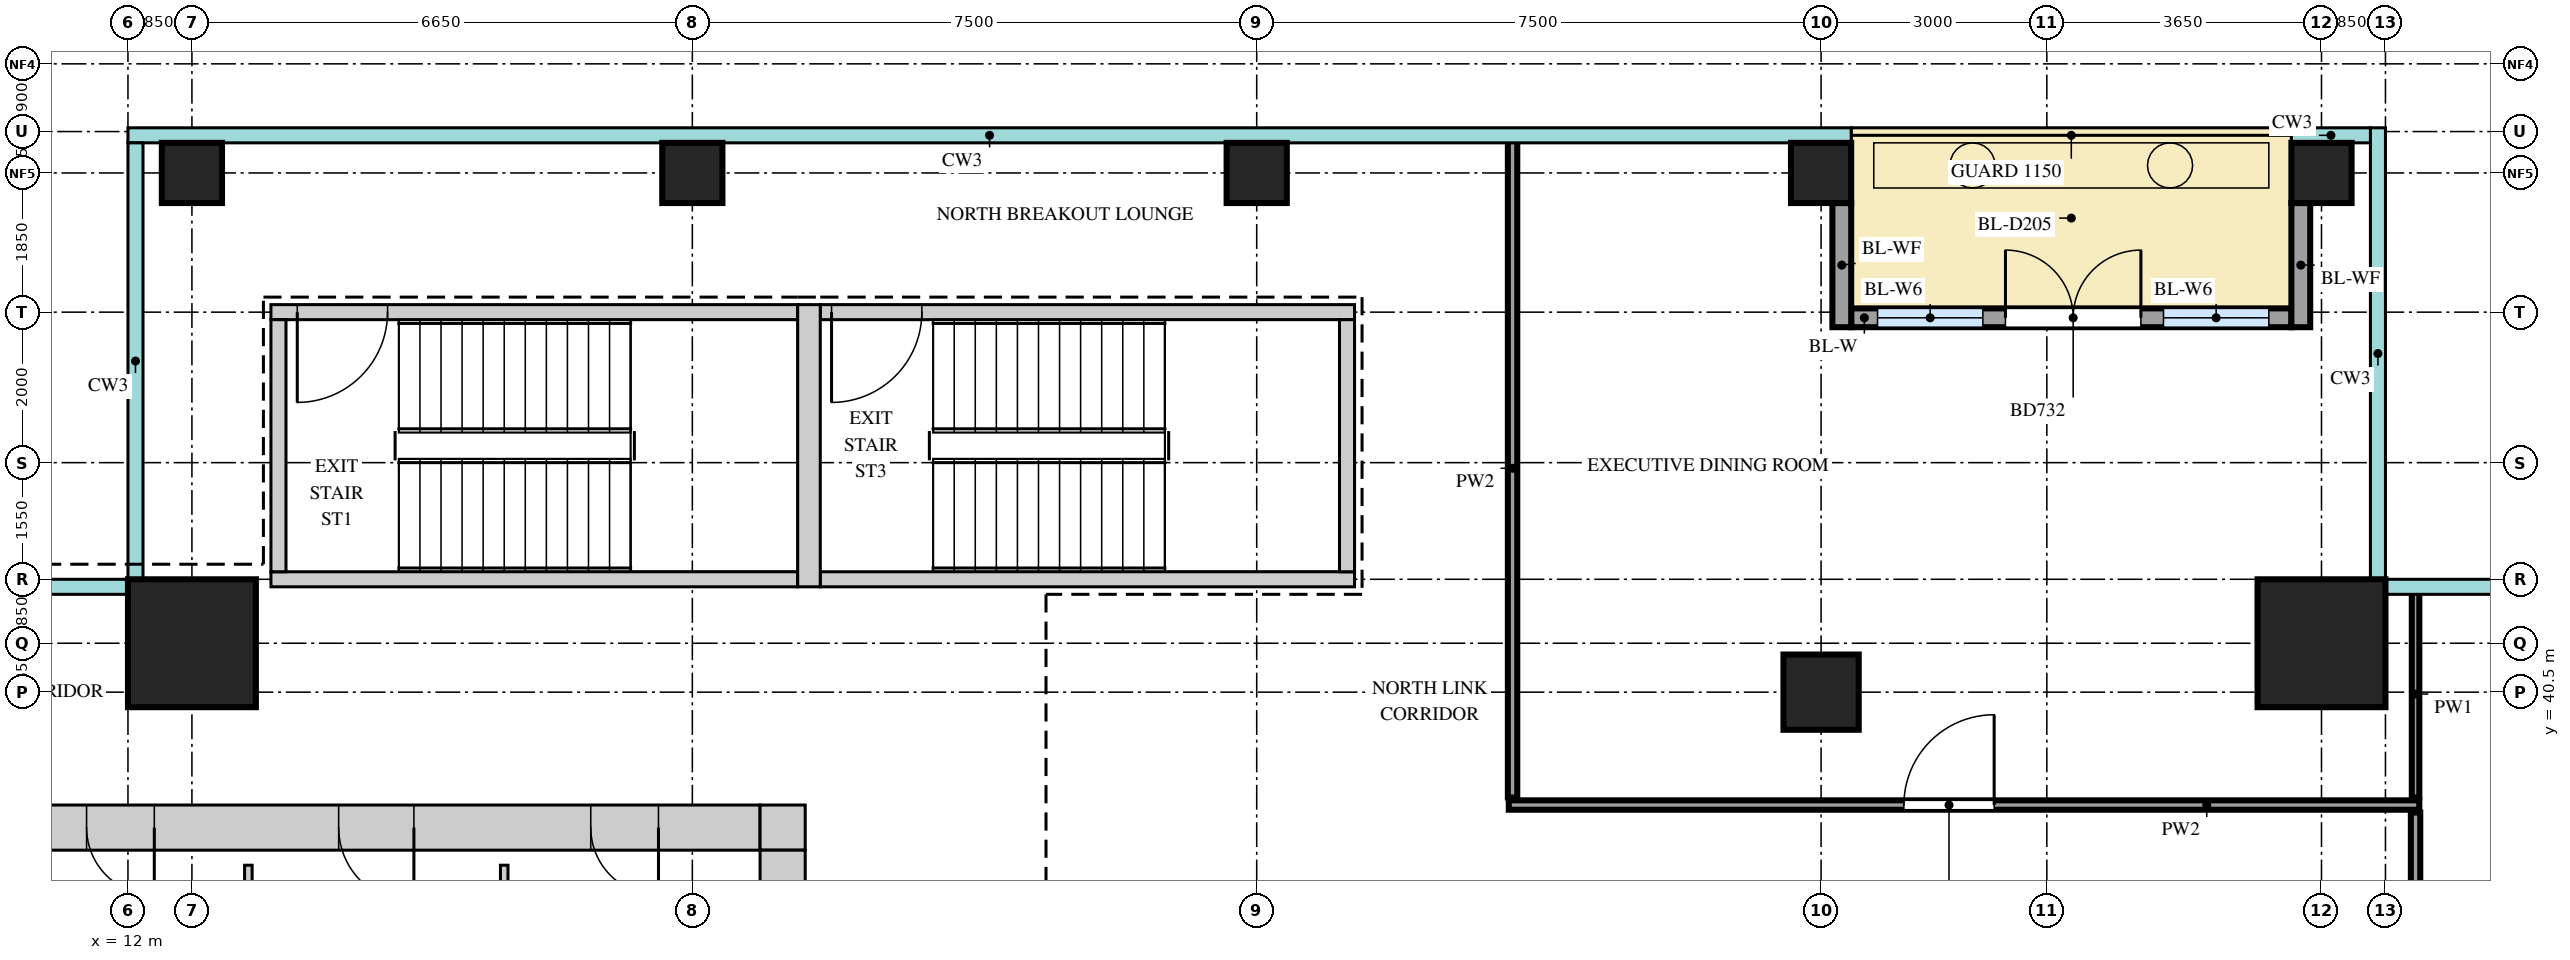
"""IFC4 building model, lengths in metres.
Left out: names, types, materials, properties, quantities, classifications, styles, units other than length and angle.
Written with IfcOpenShell. Run it as: python <this file> out.ifc"""

import sys

from ifc_helpers import new_model, si_unit, direction, frame, frame_2d, origin, origin_2d, place, context, subcontext, project, spatial, rectangle, extrude, source, transform, mapped, element, fill, save


model = new_model("IFC4")
c1 = context("Model", 3, precision=1e-05, world=origin(), true_north=direction((0.0, 1.0)))
c2 = subcontext(c1, "Body", "Model", "MODEL_VIEW")
j1 = project(units=[si_unit("LENGTHUNIT", "METRE"), si_unit("PLANEANGLEUNIT", "RADIAN")], contexts=[c1])
p1 = place(None, origin())
s1 = spatial("IfcSite", under=j1, at=p1, CompositionType="ELEMENT")
p2 = place(p1, origin())
s2 = spatial("IfcBuilding", under=s1, at=p2, CompositionType="ELEMENT")
p3 = place(p2, frame((0.0, 0.0, 322.2)))
s3 = spatial("IfcBuildingStorey", under=s2, at=p3, CompositionType="ELEMENT", Elevation=322.2)
m1 = source(origin(), c2, "Body", "SweptSolid", [
    extrude(rectangle(XDim=14.4, YDim=0.6, at=frame_2d((7.2, 0.0))), origin(), (0.0, 0.0, 1.0), 3.75),
])
p4 = place(p3, frame((6.0, 38.7, 0.0), z_axis=(0.0, 0.0, 1.0), x_axis=(1.0, 0.0, 0.0)))
e1 = element("IfcWall", 1, at=p4, inside=s3, PredefinedType="SHEAR", context=c2, shape_type="MappedRepresentation", body=[
    mapped(m1, transform((0.0, 0.0, 0.0))),
])
m2 = source(origin(), c2, "Body", "SweptSolid", [
    extrude(rectangle(XDim=0.9, YDim=2.1, at=frame_2d((0.45, 1.05))), frame((0.0, 0.31, 0.0), z_axis=(0.0, -1.0, 0.0), x_axis=(1.0, 0.0, 0.0)), (0.0, 0.0, 1.0), 0.62),
])
p5 = place(p4, frame((2.05, 0.0, 0.0)))
e2 = element("IfcOpeningElement", 2, at=p5, cuts=e1, PredefinedType="OPENING", context=c2, shape_type="MappedRepresentation", body=[
    mapped(m2, transform((0.0, 0.0, 0.0))),
])
p6 = place(p4, frame((5.45, 0.0, 0.0)))
e3 = element("IfcOpeningElement", 3, at=p6, cuts=e1, PredefinedType="OPENING", context=c2, shape_type="MappedRepresentation", body=[
    mapped(m2, transform((0.0, 0.0, 0.0))),
])
m3 = source(origin(), c2, "Body", "SweptSolid", [
    extrude(rectangle(XDim=1.0, YDim=2.1, at=frame_2d((0.5, 1.05))), frame((0.0, 0.31, 0.0), z_axis=(0.0, -1.0, 0.0), x_axis=(1.0, 0.0, 0.0)), (0.0, 0.0, 1.0), 0.62),
])
p7 = place(p4, frame((8.8, 0.0, 0.0)))
e4 = element("IfcOpeningElement", 4, at=p7, cuts=e1, PredefinedType="OPENING", context=c2, shape_type="MappedRepresentation", body=[
    mapped(m3, transform((0.0, 0.0, 0.0))),
])
p8 = place(p4, frame((12.15, 0.0, 0.0)))
e5 = element("IfcOpeningElement", 5, at=p8, cuts=e1, PredefinedType="OPENING", context=c2, shape_type="MappedRepresentation", body=[
    mapped(m2, transform((0.0, 0.0, 0.0))),
])
m4 = source(origin(), c2, "Body", "SweptSolid", [
    extrude(rectangle(XDim=0.6, YDim=0.6, at=frame_2d((0.3, 0.0))), origin(), (0.0, 0.0, 1.0), 3.75),
])
p9 = place(p3, frame((20.4, 38.7, 0.0), z_axis=(0.0, 0.0, 1.0), x_axis=(1.0, 0.0, 0.0)))
e6 = element("IfcWall", 6, at=p9, inside=s3, PredefinedType="SHEAR", context=c2, shape_type="MappedRepresentation", body=[
    mapped(m4, transform((0.0, 0.0, 0.0))),
])
m5 = source(origin(), c2, "Body", "SweptSolid", [
    extrude(rectangle(XDim=22.8, YDim=0.6, at=frame_2d((11.4, 0.0))), origin(), (0.0, 0.0, 1.0), 3.75),
])
p10 = place(p3, frame((20.7, 15.6, 0.0), z_axis=(0.0, 0.0, 1.0), x_axis=(0.0, 1.0, 0.0)))
e7 = element("IfcWall", 7, at=p10, inside=s3, PredefinedType="SHEAR", context=c2, shape_type="MappedRepresentation", body=[
    mapped(m5, transform((0.0, 0.0, 0.0))),
])
m6 = source(origin(), c2, "Body", "SweptSolid", [
    extrude(rectangle(XDim=1.8, YDim=2.1, at=frame_2d((0.9, 1.05))), frame((0.0, 0.31, 0.0), z_axis=(0.0, -1.0, 0.0), x_axis=(1.0, 0.0, 0.0)), (0.0, 0.0, 1.0), 0.62),
])
p11 = place(p10, frame((10.9, 0.0, 0.0)))
e8 = element("IfcOpeningElement", 8, at=p11, cuts=e7, PredefinedType="OPENING", context=c2, shape_type="MappedRepresentation", body=[
    mapped(m6, transform((0.0, 0.0, 0.0))),
])
p12 = place(p10, frame((0.55, 0.0, 0.0)))
e9 = element("IfcOpeningElement", 9, at=p12, cuts=e7, PredefinedType="OPENING", context=c2, shape_type="MappedRepresentation", body=[
    mapped(m2, transform((0.0, 0.0, 0.0))),
])
p13 = place(p10, frame((4.1, 0.0, 0.0)))
e10 = element("IfcOpeningElement", 10, at=p13, cuts=e7, PredefinedType="OPENING", context=c2, shape_type="MappedRepresentation", body=[
    mapped(m2, transform((0.0, 0.0, 0.0))),
])
m7 = source(origin(), c2, "Body", "SweptSolid", [
    extrude(rectangle(XDim=7.0, YDim=0.2, at=frame_2d((3.5, 0.0))), origin(), (0.0, 0.0, 1.0), 3.75),
])
p14 = place(p3, frame((13.9, 45.55, 0.0), z_axis=(0.0, 0.0, 1.0), x_axis=(1.0, 0.0, 0.0)))
e11 = element("IfcWall", 11, at=p14, inside=s3, PredefinedType="SHEAR", context=c2, shape_type="MappedRepresentation", body=[
    mapped(m7, transform((0.0, 0.0, 0.0))),
])
m8 = source(origin(), c2, "Body", "SweptSolid", [
    extrude(rectangle(XDim=1.2, YDim=2.1, at=frame_2d((0.6, 1.05))), frame((0.0, 0.11, 0.0), z_axis=(0.0, -1.0, 0.0), x_axis=(1.0, 0.0, 0.0)), (0.0, 0.0, 1.0), 0.22),
])
p15 = place(p14, frame((0.35, 0.0, 0.0)))
e12 = element("IfcOpeningElement", 12, at=p15, cuts=e11, PredefinedType="OPENING", context=c2, shape_type="MappedRepresentation", body=[
    mapped(m8, transform((0.0, 0.0, 0.0))),
])
p16 = place(p3, frame((13.9, 42.0, 0.0), z_axis=(0.0, 0.0, 1.0), x_axis=(1.0, 0.0, 0.0)))
e13 = element("IfcWall", 13, at=p16, inside=s3, PredefinedType="SHEAR", context=c2, shape_type="MappedRepresentation", body=[
    mapped(m7, transform((0.0, 0.0, 0.0))),
])
m9 = source(origin(), c2, "Body", "SweptSolid", [
    extrude(rectangle(XDim=7.1, YDim=0.2, at=frame_2d((3.55, 0.0))), origin(), (0.0, 0.0, 1.0), 3.75),
])
p17 = place(p3, frame((21.2, 45.55, 0.0), z_axis=(0.0, 0.0, 1.0), x_axis=(1.0, 0.0, 0.0)))
e14 = element("IfcWall", 14, at=p17, inside=s3, PredefinedType="SHEAR", context=c2, shape_type="MappedRepresentation", body=[
    mapped(m9, transform((0.0, 0.0, 0.0))),
])
p18 = place(p17, frame((0.15, 0.0, 0.0)))
e15 = element("IfcOpeningElement", 15, at=p18, cuts=e14, PredefinedType="OPENING", context=c2, shape_type="MappedRepresentation", body=[
    mapped(m8, transform((0.0, 0.0, 0.0))),
])
p19 = place(p3, frame((21.2, 42.0, 0.0), z_axis=(0.0, 0.0, 1.0), x_axis=(1.0, 0.0, 0.0)))
e16 = element("IfcWall", 16, at=p19, inside=s3, PredefinedType="SHEAR", context=c2, shape_type="MappedRepresentation", body=[
    mapped(m9, transform((0.0, 0.0, 0.0))),
])
m10 = source(origin(), c2, "Body", "SweptSolid", [
    extrude(rectangle(XDim=3.75, YDim=0.3, at=frame_2d((1.875, 0.0))), origin(), (0.0, 0.0, 1.0), 3.75),
])
p20 = place(p3, frame((21.05, 41.9, 0.0), z_axis=(0.0, 0.0, 1.0), x_axis=(0.0, 1.0, 0.0)))
e17 = element("IfcWall", 17, at=p20, inside=s3, PredefinedType="SHEAR", context=c2, shape_type="MappedRepresentation", body=[
    mapped(m10, transform((0.0, 0.0, 0.0))),
])
m11 = source(origin(), c2, "Body", "SweptSolid", [
    extrude(rectangle(XDim=3.35, YDim=0.2, at=frame_2d((1.675, 0.0))), origin(), (0.0, 0.0, 1.0), 3.75),
])
for number, where, z_axis, x_axis in (
    (18, (14.0, 42.1, 0.0), (0.0, 0.0, 1.0), (0.0, 1.0, 0.0)),
    (19, (28.2, 42.1, 0.0), (0.0, 0.0, 1.0), (0.0, 1.0, 0.0)),
):
    element("IfcWall", number, at=place(p3, frame(where, z_axis=z_axis, x_axis=x_axis)), inside=s3, PredefinedType="SHEAR", context=c2, shape_type="MappedRepresentation", body=[
        mapped(m11, transform((0.0, 0.0, 0.0))),
    ])
m12 = source(origin(), c2, "Body", "SweptSolid", [
    extrude(rectangle(XDim=1.7, YDim=1.7, at=origin_2d()), origin(), (0.0, 0.0, 1.0), 3.75),
])
for number, where, z_axis, x_axis in (
    (20, (41.15, 41.15, 0.0), (0.0, 0.0, 1.0), (1.0, 0.0, 0.0)),
    (21, (12.85, 41.15, 0.0), (0.0, 0.0, 1.0), (1.0, 0.0, 0.0)),
):
    element("IfcColumn", number, at=place(p3, frame(where, z_axis=z_axis, x_axis=x_axis)), inside=s3, PredefinedType="COLUMN", context=c2, shape_type="MappedRepresentation", body=[
        mapped(m12, transform((0.0, 0.0, 0.0))),
    ])
m13 = source(origin(), c2, "Body", "SweptSolid", [
    extrude(rectangle(XDim=0.8, YDim=0.8, at=origin_2d()), origin(), (0.0, 0.0, 1.0), 3.75),
])
for number, where, z_axis, x_axis in (
    (22, (12.85, 47.4, 0.0), (0.0, 0.0, 1.0), (1.0, 0.0, 0.0)),
    (23, (19.5, 47.4, 0.0), (0.0, 0.0, 1.0), (1.0, 0.0, 0.0)),
    (24, (27.0, 47.4, 0.0), (0.0, 0.0, 1.0), (1.0, 0.0, 0.0)),
    (25, (34.5, 47.4, 0.0), (0.0, 0.0, 1.0), (1.0, 0.0, 0.0)),
    (26, (41.15, 47.4, 0.0), (0.0, 0.0, 1.0), (1.0, 0.0, 0.0)),
):
    element("IfcColumn", number, at=place(p3, frame(where, z_axis=z_axis, x_axis=x_axis)), inside=s3, PredefinedType="COLUMN", context=c2, shape_type="MappedRepresentation", body=[
        mapped(m13, transform((0.0, 0.0, 0.0))),
    ])
m14 = source(origin(), c2, "Body", "SweptSolid", [
    extrude(rectangle(XDim=1.0, YDim=1.0, at=origin_2d()), origin(), (0.0, 0.0, 1.0), 3.75),
])
p21 = place(p3, frame((34.5, 40.5, 0.0), z_axis=(0.0, 0.0, 1.0), x_axis=(1.0, 0.0, 0.0)))
e27 = element("IfcColumn", 27, at=p21, inside=s3, PredefinedType="COLUMN", context=c2, shape_type="MappedRepresentation", body=[
    mapped(m14, transform((0.0, 0.0, 0.0))),
])
m15 = source(origin(), c2, "Body", "SweptSolid", [
    extrude(rectangle(XDim=5.85, YDim=0.25, at=frame_2d((2.925, 0.0))), origin(), (0.0, 0.0, 1.0), 3.75),
])
p22 = place(p3, frame((34.9, 45.475, 0.0), z_axis=(0.0, 0.0, 1.0), x_axis=(1.0, 0.0, 0.0)))
e28 = element("IfcWall", 28, at=p22, inside=s3, PredefinedType="SOLIDWALL", context=c2, shape_type="MappedRepresentation", body=[
    mapped(m15, transform((0.0, 0.0, 0.0))),
])
m16 = source(origin(), c2, "Body", "SweptSolid", [
    extrude(rectangle(XDim=1.4, YDim=2.4, at=frame_2d((0.7, 1.2))), frame((0.0, 0.135, 0.0), z_axis=(0.0, -1.0, 0.0), x_axis=(1.0, 0.0, 0.0)), (0.0, 0.0, 1.0), 0.27),
])
p23 = place(p22, frame((0.35, 0.0, 0.0)))
e29 = element("IfcOpeningElement", 29, at=p23, cuts=e28, PredefinedType="OPENING", context=c2, shape_type="MappedRepresentation", body=[
    mapped(m16, transform((0.0, 0.0, 0.0))),
])
p24 = place(p22, frame((4.15, 0.0, 0.0)))
e30 = element("IfcOpeningElement", 30, at=p24, cuts=e28, PredefinedType="OPENING", context=c2, shape_type="MappedRepresentation", body=[
    mapped(m16, transform((0.0, 0.0, 0.0))),
])
m17 = source(origin(), c2, "Body", "SweptSolid", [
    extrude(rectangle(XDim=1.8, YDim=2.4, at=frame_2d((0.9, 1.2))), frame((0.0, 0.135, 0.0), z_axis=(0.0, -1.0, 0.0), x_axis=(1.0, 0.0, 0.0)), (0.0, 0.0, 1.0), 0.27),
])
p25 = place(p22, frame((2.05, 0.0, 0.0)))
e31 = element("IfcOpeningElement", 31, at=p25, cuts=e28, PredefinedType="OPENING", context=c2, shape_type="MappedRepresentation", body=[
    mapped(m17, transform((0.0, 0.0, 0.0))),
])
m18 = source(origin(), c2, "Body", "SweptSolid", [
    extrude(rectangle(XDim=1.65, YDim=0.25, at=frame_2d((0.825, 0.0))), origin(), (0.0, 0.0, 1.0), 3.45),
])
for number, where, z_axis, x_axis in (
    (32, (34.775, 47.0, 0.0), (0.0, 0.0, 1.0), (0.0, -1.0, 0.0)),
    (33, (40.875, 47.0, 0.0), (0.0, 0.0, 1.0), (0.0, -1.0, 0.0)),
):
    element("IfcWall", number, at=place(p3, frame(where, z_axis=z_axis, x_axis=x_axis)), inside=s3, PredefinedType="SOLIDWALL", context=c2, shape_type="MappedRepresentation", body=[
        mapped(m18, transform((0.0, 0.0, 0.0))),
    ])
m19 = source(origin(), c2, "Body", "SweptSolid", [
    extrude(rectangle(XDim=23.8, YDim=0.125, at=frame_2d((11.9, 0.0))), origin(), (0.0, 0.0, 1.0), 3.8),
])
p26 = place(p3, frame((42.4, 15.1, 0.0), z_axis=(0.0, 0.0, 1.0), x_axis=(0.0, 1.0, 0.0)))
e34 = element("IfcWall", 34, at=p26, inside=s3, PredefinedType="PARTITIONING", context=c2, shape_type="MappedRepresentation", body=[
    mapped(m19, transform((0.0, 0.0, 0.0))),
])
m20 = source(origin(), c2, "Body", "SweptSolid", [
    extrude(rectangle(XDim=0.9, YDim=2.1, at=frame_2d((0.45, 1.05))), frame((0.0, 0.073, 0.0), z_axis=(0.0, -1.0, 0.0), x_axis=(1.0, 0.0, 0.0)), (0.0, 0.0, 1.0), 0.145),
])
p27 = place(p26, frame((5.3, 0.0, 0.0)))
e35 = element("IfcOpeningElement", 35, at=p27, cuts=e34, PredefinedType="OPENING", context=c2, shape_type="MappedRepresentation", body=[
    mapped(m20, transform((0.0, 0.0, 0.0))),
])
p28 = place(p26, frame((17.3, 0.0, 0.0)))
e36 = element("IfcOpeningElement", 36, at=p28, cuts=e34, PredefinedType="OPENING", context=c2, shape_type="MappedRepresentation", body=[
    mapped(m20, transform((0.0, 0.0, 0.0))),
])
m21 = source(origin(), c2, "Body", "SweptSolid", [
    extrude(rectangle(XDim=6.0, YDim=0.1, at=frame_2d((3.0, 0.0))), origin(), (0.0, 0.0, 1.0), 3.8),
])
p29 = place(p3, frame((13.6, 32.2, 0.0), z_axis=(0.0, 0.0, 1.0), x_axis=(0.0, 1.0, 0.0)))
e37 = element("IfcWall", 37, at=p29, inside=s3, PredefinedType="PARTITIONING", context=c2, shape_type="MappedRepresentation", body=[
    mapped(m21, transform((0.0, 0.0, 0.0))),
])
m22 = source(origin(), c2, "Body", "SweptSolid", [
    extrude(rectangle(XDim=5.95, YDim=0.1, at=frame_2d((2.975, 0.0))), origin(), (0.0, 0.0, 1.0), 3.8),
])
p30 = place(p3, frame((17.0, 32.25, 0.0), z_axis=(0.0, 0.0, 1.0), x_axis=(0.0, 1.0, 0.0)))
e38 = element("IfcWall", 38, at=p30, inside=s3, PredefinedType="PARTITIONING", context=c2, shape_type="MappedRepresentation", body=[
    mapped(m22, transform((0.0, 0.0, 0.0))),
])
m23 = source(origin(), c2, "Body", "SweptSolid", [
    extrude(rectangle(XDim=12.1, YDim=0.125, at=frame_2d((6.05, 0.0))), origin(), (0.0, 0.0, 1.0), 3.8),
])
p31 = place(p3, frame((30.35, 39.0, 0.0), z_axis=(0.0, 0.0, 1.0), x_axis=(1.0, 0.0, 0.0)))
e39 = element("IfcWall", 39, at=p31, inside=s3, PredefinedType="PARTITIONING", context=c2, shape_type="MappedRepresentation", body=[
    mapped(m23, transform((0.0, 0.0, 0.0))),
])
m24 = source(origin(), c2, "Body", "SweptSolid", [
    extrude(rectangle(XDim=1.2, YDim=2.1, at=frame_2d((0.6, 1.05))), frame((0.0, 0.073, 0.0), z_axis=(0.0, -1.0, 0.0), x_axis=(1.0, 0.0, 0.0)), (0.0, 0.0, 1.0), 0.145),
])
p32 = place(p31, frame((5.25, 0.0, 0.0)))
e40 = element("IfcOpeningElement", 40, at=p32, cuts=e39, PredefinedType="OPENING", context=c2, shape_type="MappedRepresentation", body=[
    mapped(m24, transform((0.0, 0.0, 0.0))),
])
m25 = source(origin(), c2, "Body", "SweptSolid", [
    extrude(rectangle(XDim=8.75, YDim=0.125, at=frame_2d((4.375, 0.0))), origin(), (0.0, 0.0, 1.0), 3.8),
])
p33 = place(p3, frame((30.4, 39.1, 0.0), z_axis=(0.0, 0.0, 1.0), x_axis=(0.0, 1.0, 0.0)))
e41 = element("IfcWall", 41, at=p33, inside=s3, PredefinedType="PARTITIONING", context=c2, shape_type="MappedRepresentation", body=[
    mapped(m25, transform((0.0, 0.0, 0.0))),
])
m26 = source(origin(), c2, "Body", "SweptSolid", [
    extrude(rectangle(XDim=2.75, YDim=0.1, at=frame_2d((1.375, 0.0))), origin(), (0.0, 0.0, 1.0), 3.8),
])
p34 = place(p3, frame((42.4, 39.1, 0.0), z_axis=(0.0, 0.0, 1.0), x_axis=(0.0, 1.0, 0.0)))
e42 = element("IfcWall", 42, at=p34, inside=s3, PredefinedType="PARTITIONING", context=c2, shape_type="MappedRepresentation", body=[
    mapped(m26, transform((0.0, 0.0, 0.0))),
])
m27 = source(origin(), c2, "Body", "SweptSolid", [
    extrude(rectangle(XDim=1.4, YDim=2.4, at=frame_2d((0.7, 1.2))), frame((0.0, 0.03, 0.0), z_axis=(0.0, -1.0, 0.0), x_axis=(1.0, 0.0, 0.0)), (0.0, 0.0, 1.0), 0.06),
])
p35 = place(p23, origin())
e43 = element("IfcWindow", 43, at=p35, inside=s3, PartitioningType="SINGLE_PANEL", PredefinedType="WINDOW", context=c2, shape_type="MappedRepresentation", body=[
    mapped(m27, transform((0.0, 0.0, 0.0))),
])
fill(e29, e43)
p36 = place(p24, origin())
e44 = element("IfcWindow", 44, at=p36, inside=s3, PartitioningType="SINGLE_PANEL", PredefinedType="WINDOW", context=c2, shape_type="MappedRepresentation", body=[
    mapped(m27, transform((0.0, 0.0, 0.0))),
])
fill(e30, e44)
m28 = source(origin(), c2, "Body", "SweptSolid", [
    extrude(rectangle(XDim=1.8, YDim=2.4, at=frame_2d((0.9, 1.2))), frame((0.0, 0.025, 0.0), z_axis=(0.0, -1.0, 0.0), x_axis=(1.0, 0.0, 0.0)), (0.0, 0.0, 1.0), 0.05),
])
p37 = place(p25, origin())
e45 = element("IfcDoor", 45, at=p37, inside=s3, OperationType="DOUBLE_DOOR_DOUBLE_SWING", PredefinedType="DOOR", context=c2, shape_type="MappedRepresentation", body=[
    mapped(m28, transform((0.0, 0.0, 0.0))),
])
fill(e31, e45)
m29 = source(origin(), c2, "Body", "SweptSolid", [
    extrude(rectangle(XDim=0.9, YDim=2.1, at=frame_2d((0.45, 1.05))), frame((0.0, 0.25, 0.0), z_axis=(0.0, -1.0, 0.0), x_axis=(1.0, 0.0, 0.0)), (0.0, 0.0, 1.0), 0.5),
])
p38 = place(p6, origin())
e46 = element("IfcDoor", 46, at=p38, inside=s3, OperationType="SINGLE_SWING_RIGHT", PredefinedType="DOOR", context=c2, shape_type="MappedRepresentation", body=[
    mapped(m29, transform((0.0, 0.0, 0.0))),
])
fill(e3, e46)
m30 = source(origin(), c2, "Body", "SweptSolid", [
    extrude(rectangle(XDim=1.0, YDim=2.1, at=frame_2d((0.5, 1.05))), frame((0.0, 0.25, 0.0), z_axis=(0.0, -1.0, 0.0), x_axis=(1.0, 0.0, 0.0)), (0.0, 0.0, 1.0), 0.5),
])
p39 = place(p7, origin())
e47 = element("IfcDoor", 47, at=p39, inside=s3, OperationType="SINGLE_SWING_RIGHT", PredefinedType="DOOR", context=c2, shape_type="MappedRepresentation", body=[
    mapped(m30, transform((0.0, 0.0, 0.0))),
])
fill(e4, e47)
p40 = place(p8, origin())
e48 = element("IfcDoor", 48, at=p40, inside=s3, OperationType="SINGLE_SWING_RIGHT", PredefinedType="DOOR", context=c2, shape_type="MappedRepresentation", body=[
    mapped(m29, transform((0.0, 0.0, 0.0))),
])
fill(e5, e48)
m31 = source(origin(), c2, "Body", "SweptSolid", [
    extrude(rectangle(XDim=1.2, YDim=2.1, at=frame_2d((0.6, 1.05))), frame((0.0, 0.025, 0.0), z_axis=(0.0, -1.0, 0.0), x_axis=(1.0, 0.0, 0.0)), (0.0, 0.0, 1.0), 0.05),
])
p41 = place(p32, origin())
e49 = element("IfcDoor", 49, at=p41, inside=s3, OperationType="SINGLE_SWING_LEFT", PredefinedType="DOOR", context=c2, shape_type="MappedRepresentation", body=[
    mapped(m31, transform((0.0, 0.0, 0.0))),
])
fill(e40, e49)
p42 = place(p15, origin())
e50 = element("IfcDoor", 50, at=p42, inside=s3, OperationType="SINGLE_SWING_LEFT", PredefinedType="DOOR", context=c2, shape_type="MappedRepresentation", body=[
    mapped(m31, transform((0.0, 0.0, 0.0))),
])
fill(e12, e50)
p43 = place(p18, origin())
e51 = element("IfcDoor", 51, at=p43, inside=s3, OperationType="SINGLE_SWING_LEFT", PredefinedType="DOOR", context=c2, shape_type="MappedRepresentation", body=[
    mapped(m31, transform((0.0, 0.0, 0.0))),
])
fill(e15, e51)
save(model, sys.argv[1])
